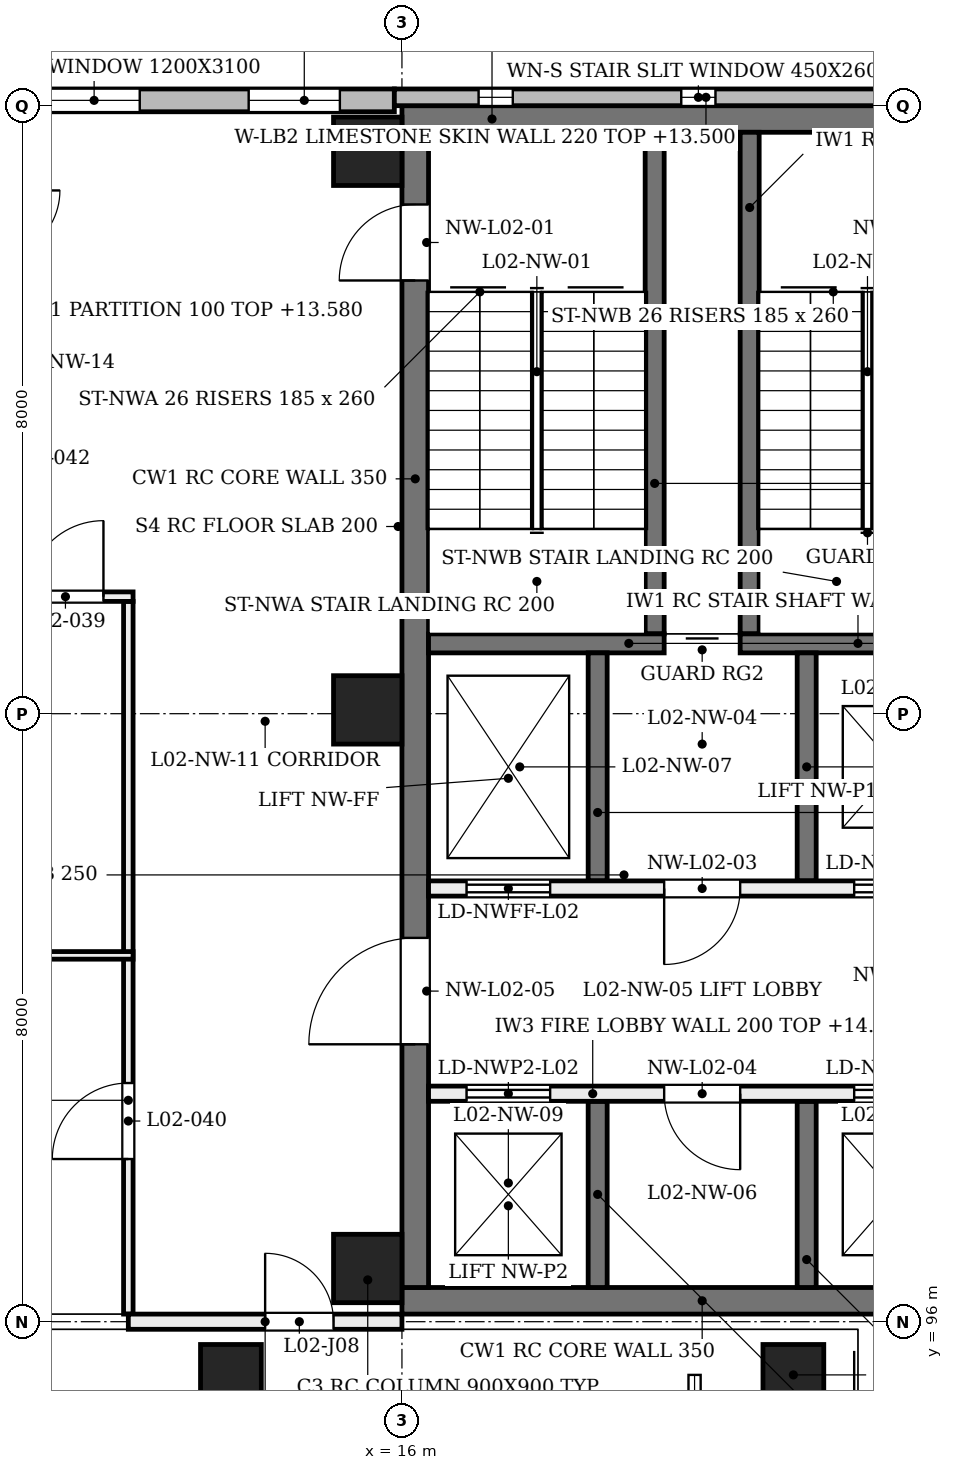
"""IFC4 building model, lengths in metres.
Left out: names, types, materials, properties, quantities, classifications, styles, units other than length and angle.
Written with IfcOpenShell. Run it as: python <this file> out.ifc"""

import sys

from ifc_helpers import new_model, si_unit, direction, frame, frame_2d, origin, origin_2d, place, context, subcontext, project, spatial, rectangle, extrude, element, fill, save


model = new_model("IFC4")
c1 = context("Model", 3, precision=1e-05, world=origin(), true_north=direction((0.0, 1.0)))
c2 = subcontext(c1, "Body", "Model", "MODEL_VIEW")
j1 = project(units=[si_unit("LENGTHUNIT", "METRE"), si_unit("PLANEANGLEUNIT", "RADIAN")], contexts=[c1])
p1 = place(None, origin())
s1 = spatial("IfcSite", under=j1, at=p1, CompositionType="ELEMENT")
p2 = place(p1, origin())
s2 = spatial("IfcBuilding", under=s1, at=p2, CompositionType="ELEMENT")
p3 = place(p2, frame((0.0, 0.0, 9.6)))
s3 = spatial("IfcBuildingStorey", under=s2, at=p3, CompositionType="ELEMENT", Elevation=9.6)
for number, where, z_axis, x_axis in (
    (1, (16.0, 96.275, 0.0), (0.0, 0.0, 1.0), (1.0, 0.0, 0.0)),
    (2, (16.0, 111.825, 0.0), (0.0, 0.0, 1.0), (1.0, 0.0, 0.0)),
):
    element("IfcWall", number, at=place(p3, frame(where, z_axis=z_axis, x_axis=x_axis)), inside=s3, PredefinedType="SHEAR", context=c2, shape_type="SweptSolid", body=[
        extrude(rectangle(XDim=7.9, YDim=0.35, at=frame_2d((3.95, 0.0))), origin(), (0.0, 0.0, 1.0), 4.58),
    ])
p4 = place(p3, frame((16.175, 96.45, 0.0), z_axis=(0.0, 0.0, 1.0), x_axis=(0.0, 1.0, 0.0)))
e3 = element("IfcWall", 3, at=p4, inside=s3, PredefinedType="SHEAR", context=c2, shape_type="SweptSolid", body=[
    extrude(rectangle(XDim=15.2, YDim=0.35, at=frame_2d((7.6, 0.0))), origin(), (0.0, 0.0, 1.0), 4.58),
])
p5 = place(p4, frame((13.25, 0.0, 0.0)))
e4 = element("IfcOpeningElement", 4, at=p5, cuts=e3, PredefinedType="OPENING", context=c2, shape_type="SweptSolid", body=[
    extrude(rectangle(XDim=1.0, YDim=2.1, at=frame_2d((0.5, 1.05))), frame((0.0, 0.185, 0.0), z_axis=(0.0, -1.0, 0.0), x_axis=(1.0, 0.0, 0.0)), (0.0, 0.0, 1.0), 0.37),
])
p6 = place(p4, frame((3.2, 0.0, 0.0)))
e5 = element("IfcOpeningElement", 5, at=p6, cuts=e3, PredefinedType="OPENING", context=c2, shape_type="SweptSolid", body=[
    extrude(rectangle(XDim=1.4, YDim=2.1, at=frame_2d((0.7, 1.05))), frame((0.0, 0.185, 0.0), z_axis=(0.0, -1.0, 0.0), x_axis=(1.0, 0.0, 0.0)), (0.0, 0.0, 1.0), 0.37),
])
for number, where, z_axis, x_axis in (
    (6, (15.55, 96.7, 0.0), (0.0, 0.0, 1.0), (1.0, 0.0, 0.0)),
    (7, (15.55, 104.05, 0.0), (0.0, 0.0, 1.0), (1.0, 0.0, 0.0)),
    (8, (15.55, 111.4, 0.0), (0.0, 0.0, 1.0), (1.0, 0.0, 0.0)),
):
    element("IfcColumn", number, at=place(p3, frame(where, z_axis=z_axis, x_axis=x_axis)), inside=s3, PredefinedType="COLUMN", context=c2, shape_type="SweptSolid", body=[
        extrude(rectangle(XDim=0.9, YDim=0.9, at=origin_2d()), origin(), (0.0, 0.0, 1.0), 4.8),
    ])
for number, where, z_axis, x_axis in (
    (9, (14.0, 95.3, 0.0), (-0.204, 0.0, 0.979), (0.0, -1.0, 0.0)),
    (10, (21.4, 95.3, 0.0), (-0.204, 0.0, 0.979), (0.0, -1.0, 0.0)),
):
    element("IfcColumn", number, at=place(p3, frame(where, z_axis=z_axis, x_axis=x_axis)), inside=s3, PredefinedType="COLUMN", context=c2, shape_type="SweptSolid", body=[
        extrude(rectangle(XDim=0.8, YDim=0.8, at=origin_2d()), origin(), (0.0, 0.0, 1.0), 4.903),
    ])
p7 = place(p3, frame((19.85, 88.2, 4.1), z_axis=(0.0, 0.0, 1.0), x_axis=(0.0, 1.0, 0.0)))
e11 = element("IfcWall", 11, at=p7, inside=s3, PredefinedType="SOLIDWALL", context=c2, shape_type="SweptSolid", body=[
    extrude(rectangle(XDim=6.9, YDim=0.15, at=frame_2d((3.45, 0.0))), origin(), (0.0, 0.0, 1.0), 0.48),
])
p8 = place(p3, frame((8.0, 112.07, 0.0), z_axis=(0.0, 0.0, 1.0), x_axis=(1.0, 0.0, 0.0)))
e12 = element("IfcWall", 12, at=p8, inside=s3, PredefinedType="SOLIDWALL", context=c2, shape_type="SweptSolid", body=[
    extrude(rectangle(XDim=7.9, YDim=0.3, at=frame_2d((3.95, 0.0))), origin(), (0.0, 0.0, 1.0), 3.9),
])
p9 = place(p8, frame((0.717, 0.0, 0.75)))
e13 = element("IfcOpeningElement", 13, at=p9, cuts=e12, PredefinedType="OPENING", context=c2, shape_type="SweptSolid", body=[
    extrude(rectangle(XDim=1.2, YDim=3.1, at=frame_2d((0.6, 1.55))), frame((0.0, 0.16, 0.0), z_axis=(0.0, -1.0, 0.0), x_axis=(1.0, 0.0, 0.0)), (0.0, 0.0, 1.0), 0.32),
])
p10 = place(p8, frame((3.35, 0.0, 0.75)))
e14 = element("IfcOpeningElement", 14, at=p10, cuts=e12, PredefinedType="OPENING", context=c2, shape_type="SweptSolid", body=[
    extrude(rectangle(XDim=1.2, YDim=3.1, at=frame_2d((0.6, 1.55))), frame((0.0, 0.16, 0.0), z_axis=(0.0, -1.0, 0.0), x_axis=(1.0, 0.0, 0.0)), (0.0, 0.0, 1.0), 0.32),
])
p11 = place(p8, frame((5.983, 0.0, 0.75)))
e15 = element("IfcOpeningElement", 15, at=p11, cuts=e12, PredefinedType="OPENING", context=c2, shape_type="SweptSolid", body=[
    extrude(rectangle(XDim=1.2, YDim=3.1, at=frame_2d((0.6, 1.55))), frame((0.0, 0.16, 0.0), z_axis=(0.0, -1.0, 0.0), x_axis=(1.0, 0.0, 0.0)), (0.0, 0.0, 1.0), 0.32),
])
p12 = place(p3, frame((15.9, 112.11, 0.0), z_axis=(0.0, 0.0, 1.0), x_axis=(1.0, 0.0, 0.0)))
e16 = element("IfcWall", 16, at=p12, inside=s3, PredefinedType="SOLIDWALL", context=c2, shape_type="SweptSolid", body=[
    extrude(rectangle(XDim=8.2, YDim=0.22, at=frame_2d((4.1, 0.0))), origin(), (0.0, 0.0, 1.0), 3.9),
])
p13 = place(p12, frame((1.108, 0.0, 0.9)))
e17 = element("IfcOpeningElement", 17, at=p13, cuts=e16, PredefinedType="OPENING", context=c2, shape_type="SweptSolid", body=[
    extrude(rectangle(XDim=0.45, YDim=2.6, at=frame_2d((0.225, 1.3))), frame((0.0, 0.12, 0.0), z_axis=(0.0, -1.0, 0.0), x_axis=(1.0, 0.0, 0.0)), (0.0, 0.0, 1.0), 0.24),
])
p14 = place(p12, frame((3.775, 0.0, 0.9)))
e18 = element("IfcOpeningElement", 18, at=p14, cuts=e16, PredefinedType="OPENING", context=c2, shape_type="SweptSolid", body=[
    extrude(rectangle(XDim=0.45, YDim=2.6, at=frame_2d((0.225, 1.3))), frame((0.0, 0.12, 0.0), z_axis=(0.0, -1.0, 0.0), x_axis=(1.0, 0.0, 0.0)), (0.0, 0.0, 1.0), 0.24),
])
p15 = place(p12, frame((6.442, 0.0, 0.9)))
e19 = element("IfcOpeningElement", 19, at=p15, cuts=e16, PredefinedType="OPENING", context=c2, shape_type="SweptSolid", body=[
    extrude(rectangle(XDim=0.45, YDim=2.6, at=frame_2d((0.225, 1.3))), frame((0.0, 0.12, 0.0), z_axis=(0.0, -1.0, 0.0), x_axis=(1.0, 0.0, 0.0)), (0.0, 0.0, 1.0), 0.24),
])
for number, where, z_axis, x_axis in (
    (20, (19.325, 111.65, 0.0), (0.0, 0.0, 1.0), (0.0, -1.0, 0.0)),
    (21, (20.575, 111.65, 0.0), (0.0, 0.0, 1.0), (0.0, -1.0, 0.0)),
):
    element("IfcWall", number, at=place(p3, frame(where, z_axis=z_axis, x_axis=x_axis)), inside=s3, PredefinedType="SOLIDWALL", context=c2, shape_type="SweptSolid", body=[
        extrude(rectangle(XDim=6.6, YDim=0.25, at=frame_2d((3.3, 0.0))), origin(), (0.0, 0.0, 1.0), 4.55),
    ])
p16 = place(p3, frame((16.35, 104.925, 0.0), z_axis=(0.0, 0.0, 1.0), x_axis=(1.0, 0.0, 0.0)))
e22 = element("IfcWall", 22, at=p16, inside=s3, PredefinedType="SOLIDWALL", context=c2, shape_type="SweptSolid", body=[
    extrude(rectangle(XDim=3.1, YDim=0.25, at=frame_2d((1.55, 0.0))), origin(), (0.0, 0.0, 1.0), 4.55),
])
p17 = place(p3, frame((20.45, 104.925, 0.0), z_axis=(0.0, 0.0, 1.0), x_axis=(1.0, 0.0, 0.0)))
e23 = element("IfcWall", 23, at=p17, inside=s3, PredefinedType="SOLIDWALL", context=c2, shape_type="SweptSolid", body=[
    extrude(rectangle(XDim=3.1, YDim=0.25, at=frame_2d((1.55, 0.0))), origin(), (0.0, 0.0, 1.0), 4.55),
])
p18 = place(p3, frame((18.575, 104.8, 0.0), z_axis=(0.0, 0.0, 1.0), x_axis=(0.0, -1.0, 0.0)))
e24 = element("IfcWall", 24, at=p18, inside=s3, PredefinedType="SOLIDWALL", context=c2, shape_type="SweptSolid", body=[
    extrude(rectangle(XDim=3.0, YDim=0.25, at=frame_2d((1.5, 0.0))), origin(), (0.0, 0.0, 1.0), 4.55),
])
p19 = place(p3, frame((18.575, 98.9, 0.0), z_axis=(0.0, 0.0, 1.0), x_axis=(0.0, -1.0, 0.0)))
e25 = element("IfcWall", 25, at=p19, inside=s3, PredefinedType="SOLIDWALL", context=c2, shape_type="SweptSolid", body=[
    extrude(rectangle(XDim=2.45, YDim=0.25, at=frame_2d((1.225, 0.0))), origin(), (0.0, 0.0, 1.0), 4.55),
])
p20 = place(p3, frame((21.325, 104.8, 0.0), z_axis=(0.0, 0.0, 1.0), x_axis=(0.0, -1.0, 0.0)))
e26 = element("IfcWall", 26, at=p20, inside=s3, PredefinedType="SOLIDWALL", context=c2, shape_type="SweptSolid", body=[
    extrude(rectangle(XDim=3.0, YDim=0.25, at=frame_2d((1.5, 0.0))), origin(), (0.0, 0.0, 1.0), 4.55),
])
p21 = place(p3, frame((21.325, 98.9, 0.0), z_axis=(0.0, 0.0, 1.0), x_axis=(0.0, -1.0, 0.0)))
e27 = element("IfcWall", 27, at=p21, inside=s3, PredefinedType="SOLIDWALL", context=c2, shape_type="SweptSolid", body=[
    extrude(rectangle(XDim=2.45, YDim=0.25, at=frame_2d((1.225, 0.0))), origin(), (0.0, 0.0, 1.0), 4.55),
])
p22 = place(p3, frame((16.35, 101.7, 0.0), z_axis=(0.0, 0.0, 1.0), x_axis=(1.0, 0.0, 0.0)))
e28 = element("IfcWall", 28, at=p22, inside=s3, PredefinedType="SOLIDWALL", context=c2, shape_type="SweptSolid", body=[
    extrude(rectangle(XDim=7.2, YDim=0.2, at=frame_2d((3.6, 0.0))), origin(), (0.0, 0.0, 1.0), 4.55),
])
p23 = place(p22, frame((0.5, 0.0, 0.0)))
e29 = element("IfcOpeningElement", 29, at=p23, cuts=e28, PredefinedType="OPENING", context=c2, shape_type="SweptSolid", body=[
    extrude(rectangle(XDim=1.1, YDim=2.1, at=frame_2d((0.55, 1.05))), frame((0.0, 0.11, 0.0), z_axis=(0.0, -1.0, 0.0), x_axis=(1.0, 0.0, 0.0)), (0.0, 0.0, 1.0), 0.22),
])
p24 = place(p22, frame((5.6, 0.0, 0.0)))
e30 = element("IfcOpeningElement", 30, at=p24, cuts=e28, PredefinedType="OPENING", context=c2, shape_type="SweptSolid", body=[
    extrude(rectangle(XDim=1.1, YDim=2.1, at=frame_2d((0.55, 1.05))), frame((0.0, 0.11, 0.0), z_axis=(0.0, -1.0, 0.0), x_axis=(1.0, 0.0, 0.0)), (0.0, 0.0, 1.0), 0.22),
])
p25 = place(p22, frame((3.1, 0.0, 0.0)))
e31 = element("IfcOpeningElement", 31, at=p25, cuts=e28, PredefinedType="OPENING", context=c2, shape_type="SweptSolid", body=[
    extrude(rectangle(XDim=1.0, YDim=2.1, at=frame_2d((0.5, 1.05))), frame((0.0, 0.11, 0.0), z_axis=(0.0, -1.0, 0.0), x_axis=(1.0, 0.0, 0.0)), (0.0, 0.0, 1.0), 0.22),
])
p26 = place(p3, frame((16.35, 99.0, 0.0), z_axis=(0.0, 0.0, 1.0), x_axis=(1.0, 0.0, 0.0)))
e32 = element("IfcWall", 32, at=p26, inside=s3, PredefinedType="SOLIDWALL", context=c2, shape_type="SweptSolid", body=[
    extrude(rectangle(XDim=7.2, YDim=0.2, at=frame_2d((3.6, 0.0))), origin(), (0.0, 0.0, 1.0), 4.55),
])
p27 = place(p26, frame((0.5, 0.0, 0.0)))
e33 = element("IfcOpeningElement", 33, at=p27, cuts=e32, PredefinedType="OPENING", context=c2, shape_type="SweptSolid", body=[
    extrude(rectangle(XDim=1.1, YDim=2.1, at=frame_2d((0.55, 1.05))), frame((0.0, 0.11, 0.0), z_axis=(0.0, -1.0, 0.0), x_axis=(1.0, 0.0, 0.0)), (0.0, 0.0, 1.0), 0.22),
])
p28 = place(p26, frame((5.6, 0.0, 0.0)))
e34 = element("IfcOpeningElement", 34, at=p28, cuts=e32, PredefinedType="OPENING", context=c2, shape_type="SweptSolid", body=[
    extrude(rectangle(XDim=1.1, YDim=2.1, at=frame_2d((0.55, 1.05))), frame((0.0, 0.11, 0.0), z_axis=(0.0, -1.0, 0.0), x_axis=(1.0, 0.0, 0.0)), (0.0, 0.0, 1.0), 0.22),
])
p29 = place(p26, frame((3.1, 0.0, 0.0)))
e35 = element("IfcOpeningElement", 35, at=p29, cuts=e32, PredefinedType="OPENING", context=c2, shape_type="SweptSolid", body=[
    extrude(rectangle(XDim=1.0, YDim=2.1, at=frame_2d((0.5, 1.05))), frame((0.0, 0.11, 0.0), z_axis=(0.0, -1.0, 0.0), x_axis=(1.0, 0.0, 0.0)), (0.0, 0.0, 1.0), 0.22),
])
p30 = place(p3, frame((12.4, 96.1, 0.0), z_axis=(0.0, 0.0, 1.0), x_axis=(0.0, 1.0, 0.0)))
e36 = element("IfcWall", 36, at=p30, inside=s3, PredefinedType="PARTITIONING", context=c2, shape_type="SweptSolid", body=[
    extrude(rectangle(XDim=9.377, YDim=0.125, at=frame_2d((4.688, 0.0))), origin(), (0.0, 0.0, 1.0), 3.88),
])
p31 = place(p30, frame((2.04, 0.0, 0.0)))
e37 = element("IfcOpeningElement", 37, at=p31, cuts=e36, PredefinedType="OPENING", context=c2, shape_type="SweptSolid", body=[
    extrude(rectangle(XDim=1.0, YDim=2.1, at=frame_2d((0.5, 1.05))), frame((0.0, 0.073, 0.0), z_axis=(0.0, -1.0, 0.0), x_axis=(1.0, 0.0, 0.0)), (0.0, 0.0, 1.0), 0.145),
])
p32 = place(p3, frame((8.08, 100.82, 0.0), z_axis=(0.0, 0.0, 1.0), x_axis=(1.0, 0.0, 0.0)))
e38 = element("IfcWall", 38, at=p32, inside=s3, PredefinedType="PARTITIONING", context=c2, shape_type="SweptSolid", body=[
    extrude(rectangle(XDim=4.382, YDim=0.1, at=frame_2d((2.191, 0.0))), origin(), (0.0, 0.0, 1.0), 3.88),
])
p33 = place(p3, frame((10.538, 105.54, 0.0), z_axis=(0.0, 0.0, 1.0), x_axis=(1.0, 0.0, 0.0)))
e39 = element("IfcWall", 39, at=p33, inside=s3, PredefinedType="PARTITIONING", context=c2, shape_type="SweptSolid", body=[
    extrude(rectangle(XDim=1.925, YDim=0.125, at=frame_2d((0.962, 0.0))), origin(), (0.0, 0.0, 1.0), 4.56),
])
p34 = place(p33, frame((0.535, 0.0, 0.0)))
e40 = element("IfcOpeningElement", 40, at=p34, cuts=e39, PredefinedType="OPENING", context=c2, shape_type="SweptSolid", body=[
    extrude(rectangle(XDim=1.0, YDim=2.1, at=frame_2d((0.5, 1.05))), frame((0.0, 0.073, 0.0), z_axis=(0.0, -1.0, 0.0), x_axis=(1.0, 0.0, 0.0)), (0.0, 0.0, 1.0), 0.145),
])
p35 = place(p3, frame((12.4, 96.0, 0.0), z_axis=(0.0, 0.0, 1.0), x_axis=(1.0, 0.0, 0.0)))
e41 = element("IfcWall", 41, at=p35, inside=s3, PredefinedType="PARTITIONING", context=c2, shape_type="SweptSolid", body=[
    extrude(rectangle(XDim=3.6, YDim=0.2, at=frame_2d((1.8, 0.0))), origin(), (0.0, 0.0, 1.0), 3.88),
])
p36 = place(p35, frame((1.8, 0.0, 0.0)))
e42 = element("IfcOpeningElement", 42, at=p36, cuts=e41, PredefinedType="OPENING", context=c2, shape_type="SweptSolid", body=[
    extrude(rectangle(XDim=0.9, YDim=2.1, at=frame_2d((0.45, 1.05))), frame((0.0, 0.11, 0.0), z_axis=(0.0, -1.0, 0.0), x_axis=(1.0, 0.0, 0.0)), (0.0, 0.0, 1.0), 0.22),
])
p37 = place(p10, origin())
e43 = element("IfcWindow", 43, at=p37, inside=s3, PartitioningType="SINGLE_PANEL", PredefinedType="WINDOW", context=c2, shape_type="SweptSolid", body=[
    extrude(rectangle(XDim=1.2, YDim=3.1, at=frame_2d((0.6, 1.55))), frame((0.0, 0.03, 0.0), z_axis=(0.0, -1.0, 0.0), x_axis=(1.0, 0.0, 0.0)), (0.0, 0.0, 1.0), 0.06),
])
fill(e14, e43)
p38 = place(p11, origin())
e44 = element("IfcWindow", 44, at=p38, inside=s3, PartitioningType="SINGLE_PANEL", PredefinedType="WINDOW", context=c2, shape_type="SweptSolid", body=[
    extrude(rectangle(XDim=1.2, YDim=3.1, at=frame_2d((0.6, 1.55))), frame((0.0, 0.03, 0.0), z_axis=(0.0, -1.0, 0.0), x_axis=(1.0, 0.0, 0.0)), (0.0, 0.0, 1.0), 0.06),
])
fill(e15, e44)
p39 = place(p13, origin())
e45 = element("IfcWindow", 45, at=p39, inside=s3, PartitioningType="SINGLE_PANEL", PredefinedType="WINDOW", context=c2, shape_type="SweptSolid", body=[
    extrude(rectangle(XDim=0.45, YDim=2.6, at=frame_2d((0.225, 1.3))), frame((0.0, 0.03, 0.0), z_axis=(0.0, -1.0, 0.0), x_axis=(1.0, 0.0, 0.0)), (0.0, 0.0, 1.0), 0.06),
])
fill(e17, e45)
p40 = place(p14, origin())
e46 = element("IfcWindow", 46, at=p40, inside=s3, PartitioningType="SINGLE_PANEL", PredefinedType="WINDOW", context=c2, shape_type="SweptSolid", body=[
    extrude(rectangle(XDim=0.45, YDim=2.6, at=frame_2d((0.225, 1.3))), frame((0.0, 0.03, 0.0), z_axis=(0.0, -1.0, 0.0), x_axis=(1.0, 0.0, 0.0)), (0.0, 0.0, 1.0), 0.06),
])
fill(e18, e46)
p41 = place(p5, origin())
e47 = element("IfcDoor", 47, at=p41, inside=s3, OperationType="SINGLE_SWING_LEFT", PredefinedType="DOOR", context=c2, shape_type="SweptSolid", body=[
    extrude(rectangle(XDim=1.0, YDim=2.1, at=frame_2d((0.5, 1.05))), frame((0.0, 0.025, 0.0), z_axis=(0.0, -1.0, 0.0), x_axis=(1.0, 0.0, 0.0)), (0.0, 0.0, 1.0), 0.05),
])
fill(e4, e47)
p42 = place(p23, frame((1.1, 0.0, 0.0), z_axis=(0.0, 0.0, 1.0), x_axis=(-1.0, 0.0, 0.0)))
e48 = element("IfcDoor", 48, at=p42, inside=s3, OperationType="DOUBLE_DOOR_SLIDING", PredefinedType="DOOR", context=c2, shape_type="SweptSolid", body=[
    extrude(rectangle(XDim=1.1, YDim=2.1, at=frame_2d((0.55, 1.05))), frame((0.0, 0.025, 0.0), z_axis=(0.0, -1.0, 0.0), x_axis=(1.0, 0.0, 0.0)), (0.0, 0.0, 1.0), 0.05),
])
fill(e29, e48)
p43 = place(p24, frame((1.1, 0.0, 0.0), z_axis=(0.0, 0.0, 1.0), x_axis=(-1.0, 0.0, 0.0)))
e49 = element("IfcDoor", 49, at=p43, inside=s3, OperationType="DOUBLE_DOOR_SLIDING", PredefinedType="DOOR", context=c2, shape_type="SweptSolid", body=[
    extrude(rectangle(XDim=1.1, YDim=2.1, at=frame_2d((0.55, 1.05))), frame((0.0, 0.025, 0.0), z_axis=(0.0, -1.0, 0.0), x_axis=(1.0, 0.0, 0.0)), (0.0, 0.0, 1.0), 0.05),
])
fill(e30, e49)
p44 = place(p27, origin())
e50 = element("IfcDoor", 50, at=p44, inside=s3, OperationType="DOUBLE_DOOR_SLIDING", PredefinedType="DOOR", context=c2, shape_type="SweptSolid", body=[
    extrude(rectangle(XDim=1.1, YDim=2.1, at=frame_2d((0.55, 1.05))), frame((0.0, 0.025, 0.0), z_axis=(0.0, -1.0, 0.0), x_axis=(1.0, 0.0, 0.0)), (0.0, 0.0, 1.0), 0.05),
])
fill(e33, e50)
p45 = place(p28, origin())
e51 = element("IfcDoor", 51, at=p45, inside=s3, OperationType="DOUBLE_DOOR_SLIDING", PredefinedType="DOOR", context=c2, shape_type="SweptSolid", body=[
    extrude(rectangle(XDim=1.1, YDim=2.1, at=frame_2d((0.55, 1.05))), frame((0.0, 0.025, 0.0), z_axis=(0.0, -1.0, 0.0), x_axis=(1.0, 0.0, 0.0)), (0.0, 0.0, 1.0), 0.05),
])
fill(e34, e51)
p46 = place(p25, frame((1.0, 0.0, 0.0), z_axis=(0.0, 0.0, 1.0), x_axis=(-1.0, 0.0, 0.0)))
e52 = element("IfcDoor", 52, at=p46, inside=s3, OperationType="SINGLE_SWING_LEFT", PredefinedType="DOOR", context=c2, shape_type="SweptSolid", body=[
    extrude(rectangle(XDim=1.0, YDim=2.1, at=frame_2d((0.5, 1.05))), frame((0.0, 0.025, 0.0), z_axis=(0.0, -1.0, 0.0), x_axis=(1.0, 0.0, 0.0)), (0.0, 0.0, 1.0), 0.05),
])
fill(e31, e52)
p47 = place(p29, origin())
e53 = element("IfcDoor", 53, at=p47, inside=s3, OperationType="SINGLE_SWING_RIGHT", PredefinedType="DOOR", context=c2, shape_type="SweptSolid", body=[
    extrude(rectangle(XDim=1.0, YDim=2.1, at=frame_2d((0.5, 1.05))), frame((0.0, 0.025, 0.0), z_axis=(0.0, -1.0, 0.0), x_axis=(1.0, 0.0, 0.0)), (0.0, 0.0, 1.0), 0.05),
])
fill(e35, e53)
p48 = place(p6, origin())
e54 = element("IfcDoor", 54, at=p48, inside=s3, OperationType="SINGLE_SWING_LEFT", PredefinedType="DOOR", context=c2, shape_type="SweptSolid", body=[
    extrude(rectangle(XDim=1.4, YDim=2.1, at=frame_2d((0.7, 1.05))), frame((0.0, 0.025, 0.0), z_axis=(0.0, -1.0, 0.0), x_axis=(1.0, 0.0, 0.0)), (0.0, 0.0, 1.0), 0.05),
])
fill(e5, e54)
p49 = place(p34, frame((1.0, 0.0, 0.0), z_axis=(0.0, 0.0, 1.0), x_axis=(-1.0, 0.0, 0.0)))
e55 = element("IfcDoor", 55, at=p49, inside=s3, OperationType="SINGLE_SWING_RIGHT", PredefinedType="DOOR", context=c2, shape_type="SweptSolid", body=[
    extrude(rectangle(XDim=1.0, YDim=2.1, at=frame_2d((0.5, 1.05))), frame((0.0, 0.025, 0.0), z_axis=(0.0, -1.0, 0.0), x_axis=(1.0, 0.0, 0.0)), (0.0, 0.0, 1.0), 0.05),
])
fill(e40, e55)
p50 = place(p31, origin())
e56 = element("IfcDoor", 56, at=p50, inside=s3, OperationType="SINGLE_SWING_LEFT", PredefinedType="DOOR", context=c2, shape_type="SweptSolid", body=[
    extrude(rectangle(XDim=1.0, YDim=2.1, at=frame_2d((0.5, 1.05))), frame((0.0, 0.025, 0.0), z_axis=(0.0, -1.0, 0.0), x_axis=(1.0, 0.0, 0.0)), (0.0, 0.0, 1.0), 0.05),
])
fill(e37, e56)
p51 = place(p36, origin())
e57 = element("IfcDoor", 57, at=p51, inside=s3, OperationType="SINGLE_SWING_LEFT", PredefinedType="DOOR", context=c2, shape_type="SweptSolid", body=[
    extrude(rectangle(XDim=0.9, YDim=2.1, at=frame_2d((0.45, 1.05))), frame((0.0, 0.025, 0.0), z_axis=(0.0, -1.0, 0.0), x_axis=(1.0, 0.0, 0.0)), (0.0, 0.0, 1.0), 0.05),
])
fill(e42, e57)
save(model, sys.argv[1])
